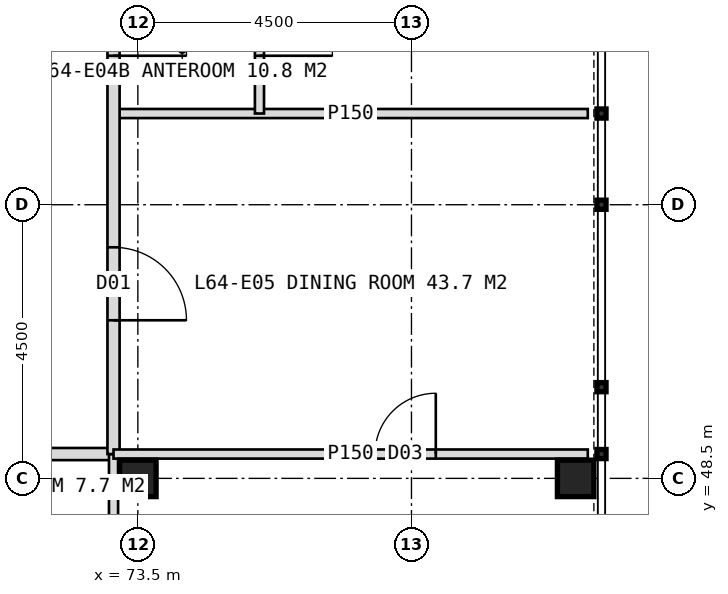
"""IFC4 building model, lengths in metres.
Left out: names, types, materials, properties, quantities, classifications, styles, units other than length and angle.
Written with IfcOpenShell. Run it as: python <this file> out.ifc"""

import sys

from ifc_helpers import new_model, si_unit, direction, frame, frame_2d, origin, origin_2d, place, context, subcontext, project, spatial, rectangle, hollow_rectangle, extrude, element, fill, save


model = new_model("IFC4")
c1 = context("Model", 3, precision=1e-05, world=origin(), true_north=direction((0.0, 1.0)))
c2 = subcontext(c1, "Body", "Model", "MODEL_VIEW")
j1 = project(units=[si_unit("LENGTHUNIT", "METRE"), si_unit("PLANEANGLEUNIT", "RADIAN")], contexts=[c1])
p1 = place(None, origin())
s1 = spatial("IfcSite", under=j1, at=p1, CompositionType="ELEMENT")
p2 = place(p1, origin())
s2 = spatial("IfcBuilding", under=s1, at=p2, CompositionType="ELEMENT")
p3 = place(p2, frame((0.0, 0.0, 266.0)))
s3 = spatial("IfcBuildingStorey", under=s2, at=p3, CompositionType="ELEMENT", Elevation=266.0)
for number, where, z_axis, x_axis in (
    (1, (73.5, 48.5, 0.0), (0.0, 0.0, 1.0), (1.0, 0.0, 0.0)),
    (2, (80.7, 48.5, 0.0), (0.0, 0.0, 1.0), (1.0, 0.0, 0.0)),
):
    element("IfcColumn", number, at=place(p3, frame(where, z_axis=z_axis, x_axis=x_axis)), inside=s3, PredefinedType="COLUMN", context=c2, shape_type="SweptSolid", body=[
        extrude(hollow_rectangle(XDim=0.6, YDim=0.6, WallThickness=0.04, at=origin_2d()), origin(), (0.0, 0.0, 1.0), 4.0),
    ])
p4 = place(p3, frame((73.1, 48.9, 0.0), z_axis=(0.0, 0.0, 1.0), x_axis=(-1.0, 0.0, 0.0)))
e3 = element("IfcWall", 3, at=p4, inside=s3, PredefinedType="PARTITIONING", context=c2, shape_type="SweptSolid", body=[
    extrude(rectangle(XDim=26.2, YDim=0.2, at=frame_2d((13.1, 0.0))), origin(), (0.0, 0.0, 1.0), 3.75),
])
p5 = place(p4, frame((1.75, 0.0, 0.0)))
e4 = element("IfcOpeningElement", 4, at=p5, cuts=e3, PredefinedType="OPENING", context=c2, shape_type="SweptSolid", body=[
    extrude(rectangle(XDim=1.2, YDim=2.2, at=frame_2d((0.6, 1.1))), frame((0.0, 0.11, 0.0), z_axis=(0.0, -1.0, 0.0), x_axis=(1.0, 0.0, 0.0)), (0.0, 0.0, 1.0), 0.22),
])
p6 = place(p4, frame((6.75, 0.0, 0.0)))
e5 = element("IfcOpeningElement", 5, at=p6, cuts=e3, PredefinedType="OPENING", context=c2, shape_type="SweptSolid", body=[
    extrude(rectangle(XDim=1.0, YDim=2.1, at=frame_2d((0.5, 1.05))), frame((0.0, 0.11, 0.0), z_axis=(0.0, -1.0, 0.0), x_axis=(1.0, 0.0, 0.0)), (0.0, 0.0, 1.0), 0.22),
])
p7 = place(p4, frame((14.25, 0.0, 0.0)))
e6 = element("IfcOpeningElement", 6, at=p7, cuts=e3, PredefinedType="OPENING", context=c2, shape_type="SweptSolid", body=[
    extrude(rectangle(XDim=1.2, YDim=2.2, at=frame_2d((0.6, 1.1))), frame((0.0, 0.11, 0.0), z_axis=(0.0, -1.0, 0.0), x_axis=(1.0, 0.0, 0.0)), (0.0, 0.0, 1.0), 0.22),
])
p8 = place(p4, frame((20.45, 0.0, 0.0)))
e7 = element("IfcOpeningElement", 7, at=p8, cuts=e3, PredefinedType="OPENING", context=c2, shape_type="SweptSolid", body=[
    extrude(rectangle(XDim=0.9, YDim=2.1, at=frame_2d((0.45, 1.05))), frame((0.0, 0.11, 0.0), z_axis=(0.0, -1.0, 0.0), x_axis=(1.0, 0.0, 0.0)), (0.0, 0.0, 1.0), 0.22),
])
p9 = place(p4, frame((18.45, 0.0, 0.0)))
e8 = element("IfcOpeningElement", 8, at=p9, cuts=e3, PredefinedType="OPENING", context=c2, shape_type="SweptSolid", body=[
    extrude(rectangle(XDim=1.0, YDim=2.1, at=frame_2d((0.5, 1.05))), frame((0.0, 0.11, 0.0), z_axis=(0.0, -1.0, 0.0), x_axis=(1.0, 0.0, 0.0)), (0.0, 0.0, 1.0), 0.22),
])
p10 = place(p4, frame((23.65, 0.0, 0.0)))
e9 = element("IfcOpeningElement", 9, at=p10, cuts=e3, PredefinedType="OPENING", context=c2, shape_type="SweptSolid", body=[
    extrude(rectangle(XDim=1.0, YDim=2.1, at=frame_2d((0.5, 1.05))), frame((0.0, 0.11, 0.0), z_axis=(0.0, -1.0, 0.0), x_axis=(1.0, 0.0, 0.0)), (0.0, 0.0, 1.0), 0.22),
])
for number, where, z_axis, x_axis in (
    (10, (73.1, 48.9, 0.0), (0.0, 0.0, 1.0), (0.0, -1.0, 0.0)),
    (11, (73.1, 54.5, 0.0), (0.0, 0.0, 1.0), (1.0, 0.0, 0.0)),
):
    element("IfcWall", number, at=place(p3, frame(where, z_axis=z_axis, x_axis=x_axis)), inside=s3, PredefinedType="PARTITIONING", context=c2, shape_type="SweptSolid", body=[
        extrude(rectangle(XDim=7.8, YDim=0.15, at=frame_2d((3.9, 0.0))), origin(), (0.0, 0.0, 1.0), 3.75),
    ])
p11 = place(p3, frame((73.1, 71.0, 0.0), z_axis=(0.0, 0.0, 1.0), x_axis=(0.0, -1.0, 0.0)))
e12 = element("IfcWall", 12, at=p11, inside=s3, PredefinedType="PARTITIONING", context=c2, shape_type="SweptSolid", body=[
    extrude(rectangle(XDim=22.1, YDim=0.2, at=frame_2d((11.05, 0.0))), origin(), (0.0, 0.0, 1.0), 3.75),
])
p12 = place(p11, frame((2.65, 0.0, 0.0)))
e13 = element("IfcOpeningElement", 13, at=p12, cuts=e12, PredefinedType="OPENING", context=c2, shape_type="SweptSolid", body=[
    extrude(rectangle(XDim=1.0, YDim=2.1, at=frame_2d((0.5, 1.05))), frame((0.0, 0.11, 0.0), z_axis=(0.0, -1.0, 0.0), x_axis=(1.0, 0.0, 0.0)), (0.0, 0.0, 1.0), 0.22),
])
p13 = place(p11, frame((7.0, 0.0, 0.0)))
e14 = element("IfcOpeningElement", 14, at=p13, cuts=e12, PredefinedType="OPENING", context=c2, shape_type="SweptSolid", body=[
    extrude(rectangle(XDim=1.0, YDim=2.1, at=frame_2d((0.5, 1.05))), frame((0.0, 0.11, 0.0), z_axis=(0.0, -1.0, 0.0), x_axis=(1.0, 0.0, 0.0)), (0.0, 0.0, 1.0), 0.22),
])
p14 = place(p11, frame((14.35, 0.0, 0.0)))
e15 = element("IfcOpeningElement", 15, at=p14, cuts=e12, PredefinedType="OPENING", context=c2, shape_type="SweptSolid", body=[
    extrude(rectangle(XDim=1.2, YDim=2.2, at=frame_2d((0.6, 1.1))), frame((0.0, 0.11, 0.0), z_axis=(0.0, -1.0, 0.0), x_axis=(1.0, 0.0, 0.0)), (0.0, 0.0, 1.0), 0.22),
])
p15 = place(p11, frame((18.7, 0.0, 0.0)))
e16 = element("IfcOpeningElement", 16, at=p15, cuts=e12, PredefinedType="OPENING", context=c2, shape_type="SweptSolid", body=[
    extrude(rectangle(XDim=1.2, YDim=2.2, at=frame_2d((0.6, 1.1))), frame((0.0, 0.11, 0.0), z_axis=(0.0, -1.0, 0.0), x_axis=(1.0, 0.0, 0.0)), (0.0, 0.0, 1.0), 0.22),
])
p16 = place(p3, frame((75.5, 59.0, 0.0), z_axis=(0.0, 0.0, 1.0), x_axis=(0.0, -1.0, 0.0)))
e17 = element("IfcWall", 17, at=p16, inside=s3, PredefinedType="PARTITIONING", context=c2, shape_type="SweptSolid", body=[
    extrude(rectangle(XDim=4.5, YDim=0.15, at=frame_2d((2.25, 0.0))), origin(), (0.0, 0.0, 1.0), 3.75),
])
p17 = place(p16, frame((2.35, 0.0, 0.0)))
e18 = element("IfcOpeningElement", 18, at=p17, cuts=e17, PredefinedType="OPENING", context=c2, shape_type="SweptSolid", body=[
    extrude(rectangle(XDim=1.2, YDim=2.2, at=frame_2d((0.6, 1.1))), frame((0.0, 0.085, 0.0), z_axis=(0.0, -1.0, 0.0), x_axis=(1.0, 0.0, 0.0)), (0.0, 0.0, 1.0), 0.17),
])
p18 = place(p3, frame((73.1, 48.9, 0.0), z_axis=(0.0, 0.0, 1.0), x_axis=(1.0, 0.0, 0.0)))
e19 = element("IfcWall", 19, at=p18, inside=s3, PredefinedType="PARTITIONING", context=c2, shape_type="SweptSolid", body=[
    extrude(rectangle(XDim=7.8, YDim=0.15, at=frame_2d((3.9, 0.0))), origin(), (0.0, 0.0, 1.0), 3.75),
])
p19 = place(p18, frame((4.3, 0.0, 0.0)))
e20 = element("IfcOpeningElement", 20, at=p19, cuts=e19, PredefinedType="OPENING", context=c2, shape_type="SweptSolid", body=[
    extrude(rectangle(XDim=1.0, YDim=2.1, at=frame_2d((0.5, 1.05))), frame((0.0, 0.085, 0.0), z_axis=(0.0, -1.0, 0.0), x_axis=(1.0, 0.0, 0.0)), (0.0, 0.0, 1.0), 0.17),
])
p20 = place(p17, origin())
e21 = element("IfcDoor", 21, at=p20, inside=s3, OperationType="SINGLE_SWING_RIGHT", PredefinedType="DOOR", context=c2, shape_type="SweptSolid", body=[
    extrude(rectangle(XDim=1.2, YDim=2.2, at=frame_2d((0.6, 1.1))), frame((0.0, 0.025, 0.0), z_axis=(0.0, -1.0, 0.0), x_axis=(1.0, 0.0, 0.0)), (0.0, 0.0, 1.0), 0.05),
])
fill(e18, e21)
p21 = place(p14, origin())
e22 = element("IfcDoor", 22, at=p21, inside=s3, OperationType="SINGLE_SWING_RIGHT", PredefinedType="DOOR", context=c2, shape_type="SweptSolid", body=[
    extrude(rectangle(XDim=1.2, YDim=2.2, at=frame_2d((0.6, 1.1))), frame((0.0, 0.025, 0.0), z_axis=(0.0, -1.0, 0.0), x_axis=(1.0, 0.0, 0.0)), (0.0, 0.0, 1.0), 0.05),
])
fill(e15, e22)
p22 = place(p19, origin())
e23 = element("IfcDoor", 23, at=p22, inside=s3, OperationType="SINGLE_SWING_RIGHT", PredefinedType="DOOR", context=c2, shape_type="SweptSolid", body=[
    extrude(rectangle(XDim=1.0, YDim=2.1, at=frame_2d((0.5, 1.05))), frame((0.0, 0.025, 0.0), z_axis=(0.0, -1.0, 0.0), x_axis=(1.0, 0.0, 0.0)), (0.0, 0.0, 1.0), 0.05),
])
fill(e20, e23)
p23 = place(p15, origin())
e24 = element("IfcDoor", 24, at=p23, inside=s3, OperationType="SINGLE_SWING_RIGHT", PredefinedType="DOOR", context=c2, shape_type="SweptSolid", body=[
    extrude(rectangle(XDim=1.2, YDim=2.2, at=frame_2d((0.6, 1.1))), frame((0.0, 0.025, 0.0), z_axis=(0.0, -1.0, 0.0), x_axis=(1.0, 0.0, 0.0)), (0.0, 0.0, 1.0), 0.05),
])
fill(e16, e24)
save(model, sys.argv[1])
